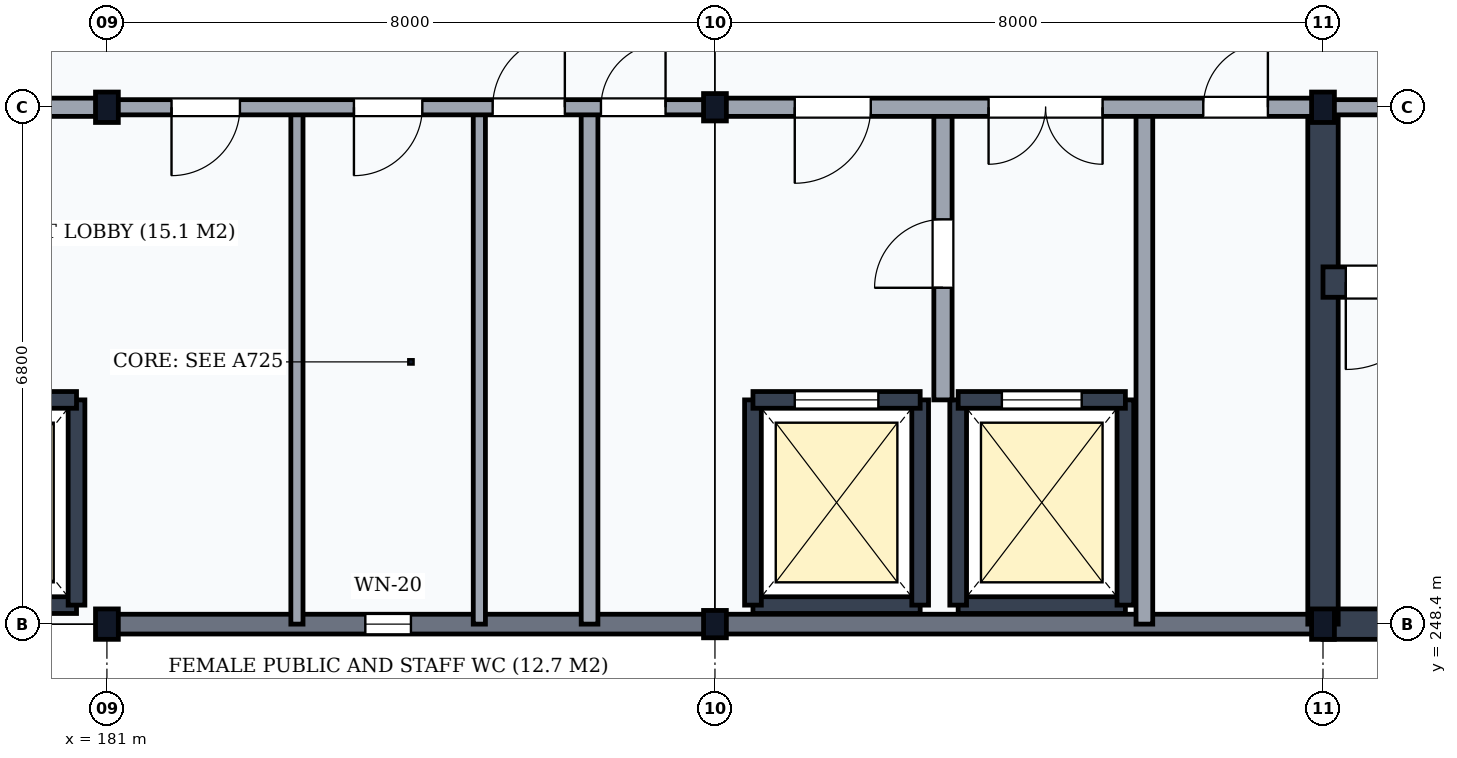
"""IFC4 building model, lengths in metres.
Left out: names, types, materials, properties, quantities, classifications, styles, units other than length and angle.
Written with IfcOpenShell. Run it as: python <this file> out.ifc"""

import sys

from ifc_helpers import new_model, si_unit, direction, frame, frame_2d, origin, origin_2d, place, context, subcontext, project, spatial, rectangle, i_section, extrude, element, fill, save


model = new_model("IFC4")
c1 = context("Model", 3, precision=1e-05, world=origin(), true_north=direction((0.0, 1.0)))
c2 = subcontext(c1, "Body", "Model", "MODEL_VIEW")
j1 = project(units=[si_unit("LENGTHUNIT", "METRE"), si_unit("PLANEANGLEUNIT", "RADIAN")], contexts=[c1])
p1 = place(None, origin())
s1 = spatial("IfcSite", under=j1, at=p1, CompositionType="ELEMENT")
p2 = place(p1, origin())
s2 = spatial("IfcBuilding", under=s1, at=p2, CompositionType="ELEMENT")
p3 = place(p2, frame((0.0, 0.0, 60.0)))
s3 = spatial("IfcBuildingStorey", under=s2, at=p3, CompositionType="ELEMENT", Elevation=60.0)
for number, where, z_axis, x_axis in (
    (1, (181.0, 248.4, 0.0), (0.0, 0.0, 1.0), (1.0, 0.0, 0.0)),
    (2, (181.0, 255.2, 0.0), (0.0, 0.0, 1.0), (1.0, 0.0, 0.0)),
):
    element("IfcColumn", number, at=place(p3, frame(where, z_axis=z_axis, x_axis=x_axis)), inside=s3, PredefinedType="COLUMN", context=c2, shape_type="SweptSolid", body=[
        extrude(i_section(OverallWidth=0.3, OverallDepth=0.4, WebThickness=0.013, FlangeThickness=0.024, FilletRadius=0.027, at=origin_2d()), origin(), (0.0, 0.0, 1.0), 3.9),
    ])
for number, where, z_axis, x_axis in (
    (3, (189.0, 248.4, 0.0), (0.0, 0.0, 1.0), (1.0, 0.0, 0.0)),
    (4, (189.0, 255.2, 0.0), (0.0, 0.0, 1.0), (1.0, 0.0, 0.0)),
):
    element("IfcColumn", number, at=place(p3, frame(where, z_axis=z_axis, x_axis=x_axis)), inside=s3, PredefinedType="COLUMN", context=c2, shape_type="SweptSolid", body=[
        extrude(i_section(OverallWidth=0.3, OverallDepth=0.36, WebThickness=0.012, FlangeThickness=0.022, FilletRadius=0.027, at=origin_2d()), origin(), (0.0, 0.0, 1.0), 3.9),
    ])
for number, where, z_axis, x_axis in (
    (5, (197.0, 248.4, 0.0), (0.0, 0.0, 1.0), (1.0, 0.0, 0.0)),
    (6, (197.0, 255.2, 0.0), (0.0, 0.0, 1.0), (1.0, 0.0, 0.0)),
):
    element("IfcColumn", number, at=place(p3, frame(where, z_axis=z_axis, x_axis=x_axis)), inside=s3, PredefinedType="COLUMN", context=c2, shape_type="SweptSolid", body=[
        extrude(i_section(OverallWidth=0.3, OverallDepth=0.4, WebThickness=0.013, FlangeThickness=0.024, FilletRadius=0.027, at=origin_2d()), origin(), (0.0, 0.0, 1.0), 3.9),
    ])
p4 = place(p3, frame((181.006, 248.4, 0.0), z_axis=(0.0, 0.0, 1.0), x_axis=(1.0, 0.0, 0.0)))
e7 = element("IfcWall", 7, at=p4, inside=s3, PredefinedType="SOLIDWALL", context=c2, shape_type="SweptSolid", body=[
    extrude(rectangle(XDim=7.988, YDim=0.26, at=frame_2d((3.994, 0.0))), origin(), (0.0, 0.0, 1.0), 3.268),
])
p5 = place(p4, frame((3.394, 0.0, 0.95)))
e8 = element("IfcOpeningElement", 8, at=p5, cuts=e7, PredefinedType="OPENING", context=c2, shape_type="SweptSolid", body=[
    extrude(rectangle(XDim=0.6, YDim=1.5, at=frame_2d((0.3, 0.75))), frame((0.0, 0.145, 0.0), z_axis=(0.0, -1.0, 0.0), x_axis=(1.0, 0.0, 0.0)), (0.0, 0.0, 1.0), 0.29),
])
p6 = place(p3, frame((189.006, 248.4, 0.0), z_axis=(0.0, 0.0, 1.0), x_axis=(1.0, 0.0, 0.0)))
e9 = element("IfcWall", 9, at=p6, inside=s3, PredefinedType="SOLIDWALL", context=c2, shape_type="SweptSolid", body=[
    extrude(rectangle(XDim=7.988, YDim=0.26, at=frame_2d((3.994, 0.0))), origin(), (0.0, 0.0, 1.0), 3.268),
])
p7 = place(p3, frame((197.0, 248.4, 0.0), z_axis=(0.0, 0.0, 1.0), x_axis=(1.0, 0.0, 0.0)))
e10 = element("IfcWall", 10, at=p7, inside=s3, PredefinedType="SHEAR", context=c2, shape_type="SweptSolid", body=[
    extrude(rectangle(XDim=8.0, YDim=0.4, at=frame_2d((4.0, 0.0))), origin(), (0.0, 0.0, 1.0), 3.58),
])
p8 = place(p3, frame((197.0, 248.4, 0.0), z_axis=(0.0, 0.0, 1.0), x_axis=(0.0, 1.0, 0.0)))
e11 = element("IfcWall", 11, at=p8, inside=s3, PredefinedType="SHEAR", context=c2, shape_type="SweptSolid", body=[
    extrude(rectangle(XDim=6.8, YDim=0.4, at=frame_2d((3.4, 0.0))), origin(), (0.0, 0.0, 1.0), 3.58),
])
p9 = place(p3, frame((197.0, 252.9, 0.0), z_axis=(0.0, 0.0, 1.0), x_axis=(1.0, 0.0, 0.0)))
e12 = element("IfcWall", 12, at=p9, inside=s3, PredefinedType="SHEAR", context=c2, shape_type="SweptSolid", body=[
    extrude(rectangle(XDim=8.0, YDim=0.4, at=frame_2d((4.0, 0.0))), origin(), (0.0, 0.0, 1.0), 3.58),
])
p10 = place(p9, frame((0.3, 0.0, 0.0)))
e13 = element("IfcOpeningElement", 13, at=p10, cuts=e12, PredefinedType="OPENING", context=c2, shape_type="SweptSolid", body=[
    extrude(rectangle(XDim=1.15, YDim=2.15, at=frame_2d((0.575, 1.075))), frame((0.0, 0.215, 0.0), z_axis=(0.0, -1.0, 0.0), x_axis=(1.0, 0.0, 0.0)), (0.0, 0.0, 1.0), 0.43),
])
p11 = place(p3, frame((197.0, 255.2, 0.0), z_axis=(0.0, 0.0, 1.0), x_axis=(1.0, 0.0, 0.0)))
e14 = element("IfcWall", 14, at=p11, inside=s3, PredefinedType="PARTITIONING", context=c2, shape_type="SweptSolid", body=[
    extrude(rectangle(XDim=8.0, YDim=0.2, at=frame_2d((4.0, 0.0))), origin(), (0.0, 0.0, 1.0), 3.028),
])
p12 = place(p11, frame((3.275, 0.0, 0.0)))
e15 = element("IfcOpeningElement", 15, at=p12, cuts=e14, PredefinedType="OPENING", context=c2, shape_type="SweptSolid", body=[
    extrude(rectangle(XDim=1.45, YDim=2.2, at=frame_2d((0.725, 1.1))), frame((0.0, 0.115, 0.0), z_axis=(0.0, -1.0, 0.0), x_axis=(1.0, 0.0, 0.0)), (0.0, 0.0, 1.0), 0.23),
])
p13 = place(p3, frame((178.4, 248.65, 0.0), z_axis=(0.0, 0.0, 1.0), x_axis=(1.0, 0.0, 0.0)))
e16 = element("IfcWall", 16, at=p13, inside=s3, PredefinedType="SHEAR", context=c2, shape_type="SweptSolid", body=[
    extrude(rectangle(XDim=2.2, YDim=0.22, at=frame_2d((1.1, 0.0))), origin(), (0.0, 0.0, 1.0), 3.58),
])
p14 = place(p3, frame((180.6, 248.65, 0.0), z_axis=(0.0, 0.0, 1.0), x_axis=(0.0, 1.0, 0.0)))
e17 = element("IfcWall", 17, at=p14, inside=s3, PredefinedType="SHEAR", context=c2, shape_type="SweptSolid", body=[
    extrude(rectangle(XDim=2.7, YDim=0.22, at=frame_2d((1.35, 0.0))), origin(), (0.0, 0.0, 1.0), 3.58),
])
p15 = place(p3, frame((178.4, 251.35, 0.0), z_axis=(0.0, 0.0, 1.0), x_axis=(1.0, 0.0, 0.0)))
e18 = element("IfcWall", 18, at=p15, inside=s3, PredefinedType="SHEAR", context=c2, shape_type="SweptSolid", body=[
    extrude(rectangle(XDim=2.2, YDim=0.22, at=frame_2d((1.1, 0.0))), origin(), (0.0, 0.0, 1.0), 3.58),
])
p16 = place(p15, frame((0.575, 0.0, 0.0)))
e19 = element("IfcOpeningElement", 19, at=p16, cuts=e18, PredefinedType="OPENING", context=c2, shape_type="SweptSolid", body=[
    extrude(rectangle(XDim=1.05, YDim=2.15, at=frame_2d((0.525, 1.075))), frame((0.0, 0.125, 0.0), z_axis=(0.0, -1.0, 0.0), x_axis=(1.0, 0.0, 0.0)), (0.0, 0.0, 1.0), 0.25),
])
p17 = place(p3, frame((189.5, 248.65, 0.0), z_axis=(0.0, 0.0, 1.0), x_axis=(1.0, 0.0, 0.0)))
e20 = element("IfcWall", 20, at=p17, inside=s3, PredefinedType="SHEAR", context=c2, shape_type="SweptSolid", body=[
    extrude(rectangle(XDim=2.2, YDim=0.22, at=frame_2d((1.1, 0.0))), origin(), (0.0, 0.0, 1.0), 3.58),
])
for number, where, z_axis, x_axis in (
    (21, (189.5, 248.65, 0.0), (0.0, 0.0, 1.0), (0.0, 1.0, 0.0)),
    (22, (191.7, 248.65, 0.0), (0.0, 0.0, 1.0), (0.0, 1.0, 0.0)),
):
    element("IfcWall", number, at=place(p3, frame(where, z_axis=z_axis, x_axis=x_axis)), inside=s3, PredefinedType="SHEAR", context=c2, shape_type="SweptSolid", body=[
        extrude(rectangle(XDim=2.7, YDim=0.22, at=frame_2d((1.35, 0.0))), origin(), (0.0, 0.0, 1.0), 3.58),
    ])
p18 = place(p3, frame((189.5, 251.35, 0.0), z_axis=(0.0, 0.0, 1.0), x_axis=(1.0, 0.0, 0.0)))
e23 = element("IfcWall", 23, at=p18, inside=s3, PredefinedType="SHEAR", context=c2, shape_type="SweptSolid", body=[
    extrude(rectangle(XDim=2.2, YDim=0.22, at=frame_2d((1.1, 0.0))), origin(), (0.0, 0.0, 1.0), 3.58),
])
p19 = place(p18, frame((0.55, 0.0, 0.0)))
e24 = element("IfcOpeningElement", 24, at=p19, cuts=e23, PredefinedType="OPENING", context=c2, shape_type="SweptSolid", body=[
    extrude(rectangle(XDim=1.1, YDim=2.15, at=frame_2d((0.55, 1.075))), frame((0.0, 0.125, 0.0), z_axis=(0.0, -1.0, 0.0), x_axis=(1.0, 0.0, 0.0)), (0.0, 0.0, 1.0), 0.25),
])
p20 = place(p3, frame((192.2, 248.65, 0.0), z_axis=(0.0, 0.0, 1.0), x_axis=(1.0, 0.0, 0.0)))
e25 = element("IfcWall", 25, at=p20, inside=s3, PredefinedType="SHEAR", context=c2, shape_type="SweptSolid", body=[
    extrude(rectangle(XDim=2.2, YDim=0.22, at=frame_2d((1.1, 0.0))), origin(), (0.0, 0.0, 1.0), 3.58),
])
for number, where, z_axis, x_axis in (
    (26, (192.2, 248.65, 0.0), (0.0, 0.0, 1.0), (0.0, 1.0, 0.0)),
    (27, (194.4, 248.65, 0.0), (0.0, 0.0, 1.0), (0.0, 1.0, 0.0)),
):
    element("IfcWall", number, at=place(p3, frame(where, z_axis=z_axis, x_axis=x_axis)), inside=s3, PredefinedType="SHEAR", context=c2, shape_type="SweptSolid", body=[
        extrude(rectangle(XDim=2.7, YDim=0.22, at=frame_2d((1.35, 0.0))), origin(), (0.0, 0.0, 1.0), 3.58),
    ])
p21 = place(p3, frame((192.2, 251.35, 0.0), z_axis=(0.0, 0.0, 1.0), x_axis=(1.0, 0.0, 0.0)))
e28 = element("IfcWall", 28, at=p21, inside=s3, PredefinedType="SHEAR", context=c2, shape_type="SweptSolid", body=[
    extrude(rectangle(XDim=2.2, YDim=0.22, at=frame_2d((1.1, 0.0))), origin(), (0.0, 0.0, 1.0), 3.58),
])
p22 = place(p21, frame((0.575, 0.0, 0.0)))
e29 = element("IfcOpeningElement", 29, at=p22, cuts=e28, PredefinedType="OPENING", context=c2, shape_type="SweptSolid", body=[
    extrude(rectangle(XDim=1.05, YDim=2.15, at=frame_2d((0.525, 1.075))), frame((0.0, 0.125, 0.0), z_axis=(0.0, -1.0, 0.0), x_axis=(1.0, 0.0, 0.0)), (0.0, 0.0, 1.0), 0.25),
])
p23 = place(p3, frame((192.0, 251.35, 0.0), z_axis=(0.0, 0.0, 1.0), x_axis=(0.0, 1.0, 0.0)))
e30 = element("IfcWall", 30, at=p23, inside=s3, PredefinedType="PARTITIONING", context=c2, shape_type="SweptSolid", body=[
    extrude(rectangle(XDim=3.85, YDim=0.24, at=frame_2d((1.925, 0.0))), origin(), (0.0, 0.0, 1.0), 3.58),
])
p24 = place(p23, frame((1.475, 0.0, 0.0)))
e31 = element("IfcOpeningElement", 31, at=p24, cuts=e30, PredefinedType="OPENING", context=c2, shape_type="SweptSolid", body=[
    extrude(rectangle(XDim=0.9, YDim=2.1, at=frame_2d((0.45, 1.05))), frame((0.0, 0.135, 0.0), z_axis=(0.0, -1.0, 0.0), x_axis=(1.0, 0.0, 0.0)), (0.0, 0.0, 1.0), 0.27),
])
p25 = place(p3, frame((194.65, 248.4, 0.0), z_axis=(0.0, 0.0, 1.0), x_axis=(0.0, 1.0, 0.0)))
e32 = element("IfcWall", 32, at=p25, inside=s3, PredefinedType="PARTITIONING", context=c2, shape_type="SweptSolid", body=[
    extrude(rectangle(XDim=6.8, YDim=0.22, at=frame_2d((3.4, 0.0))), origin(), (0.0, 0.0, 1.0), 3.58),
])
for number, where, z_axis, x_axis in (
    (33, (183.5, 248.4, 0.0), (0.0, 0.0, 1.0), (0.0, 1.0, 0.0)),
    (34, (185.9, 248.4, 0.0), (0.0, 0.0, 1.0), (0.0, 1.0, 0.0)),
):
    element("IfcWall", number, at=place(p3, frame(where, z_axis=z_axis, x_axis=x_axis)), inside=s3, PredefinedType="PARTITIONING", context=c2, shape_type="SweptSolid", body=[
        extrude(rectangle(XDim=6.8, YDim=0.16, at=frame_2d((3.4, 0.0))), origin(), (0.0, 0.0, 1.0), 3.58),
    ])
p26 = place(p3, frame((187.35, 248.4, 0.0), z_axis=(0.0, 0.0, 1.0), x_axis=(0.0, 1.0, 0.0)))
e35 = element("IfcWall", 35, at=p26, inside=s3, PredefinedType="PARTITIONING", context=c2, shape_type="SweptSolid", body=[
    extrude(rectangle(XDim=6.8, YDim=0.22, at=frame_2d((3.4, 0.0))), origin(), (0.0, 0.0, 1.0), 3.58),
])
p27 = place(p3, frame((173.0, 255.2, 0.0), z_axis=(0.0, 0.0, 1.0), x_axis=(1.0, 0.0, 0.0)))
e36 = element("IfcWall", 36, at=p27, inside=s3, PredefinedType="PARTITIONING", context=c2, shape_type="SweptSolid", body=[
    extrude(rectangle(XDim=8.0, YDim=0.24, at=frame_2d((4.0, 0.0))), origin(), (0.0, 0.0, 1.0), 3.028),
])
p28 = place(p27, frame((1.05, 0.0, 0.0)))
e37 = element("IfcOpeningElement", 37, at=p28, cuts=e36, PredefinedType="OPENING", context=c2, shape_type="SweptSolid", body=[
    extrude(rectangle(XDim=1.0, YDim=2.1, at=frame_2d((0.5, 1.05))), frame((0.0, 0.135, 0.0), z_axis=(0.0, -1.0, 0.0), x_axis=(1.0, 0.0, 0.0)), (0.0, 0.0, 1.0), 0.27),
])
p29 = place(p27, frame((4.6, 0.0, 0.0)))
e38 = element("IfcOpeningElement", 38, at=p29, cuts=e36, PredefinedType="OPENING", context=c2, shape_type="SweptSolid", body=[
    extrude(rectangle(XDim=1.6, YDim=2.25, at=frame_2d((0.8, 1.125))), frame((0.0, 0.135, 0.0), z_axis=(0.0, -1.0, 0.0), x_axis=(1.0, 0.0, 0.0)), (0.0, 0.0, 1.0), 0.27),
])
p30 = place(p3, frame((181.0, 255.2, 0.0), z_axis=(0.0, 0.0, 1.0), x_axis=(1.0, 0.0, 0.0)))
e39 = element("IfcWall", 39, at=p30, inside=s3, PredefinedType="PARTITIONING", context=c2, shape_type="SweptSolid", body=[
    extrude(rectangle(XDim=8.0, YDim=0.2, at=frame_2d((4.0, 0.0))), origin(), (0.0, 0.0, 1.0), 3.028),
])
p31 = place(p30, frame((0.85, 0.0, 0.0)))
e40 = element("IfcOpeningElement", 40, at=p31, cuts=e39, PredefinedType="OPENING", context=c2, shape_type="SweptSolid", body=[
    extrude(rectangle(XDim=0.9, YDim=2.1, at=frame_2d((0.45, 1.05))), frame((0.0, 0.115, 0.0), z_axis=(0.0, -1.0, 0.0), x_axis=(1.0, 0.0, 0.0)), (0.0, 0.0, 1.0), 0.23),
])
p32 = place(p30, frame((3.25, 0.0, 0.0)))
e41 = element("IfcOpeningElement", 41, at=p32, cuts=e39, PredefinedType="OPENING", context=c2, shape_type="SweptSolid", body=[
    extrude(rectangle(XDim=0.9, YDim=2.1, at=frame_2d((0.45, 1.05))), frame((0.0, 0.115, 0.0), z_axis=(0.0, -1.0, 0.0), x_axis=(1.0, 0.0, 0.0)), (0.0, 0.0, 1.0), 0.23),
])
p33 = place(p30, frame((5.075, 0.0, 0.0)))
e42 = element("IfcOpeningElement", 42, at=p33, cuts=e39, PredefinedType="OPENING", context=c2, shape_type="SweptSolid", body=[
    extrude(rectangle(XDim=0.95, YDim=2.1, at=frame_2d((0.475, 1.05))), frame((0.0, 0.115, 0.0), z_axis=(0.0, -1.0, 0.0), x_axis=(1.0, 0.0, 0.0)), (0.0, 0.0, 1.0), 0.23),
])
p34 = place(p30, frame((6.5, 0.0, 0.0)))
e43 = element("IfcOpeningElement", 43, at=p34, cuts=e39, PredefinedType="OPENING", context=c2, shape_type="SweptSolid", body=[
    extrude(rectangle(XDim=0.85, YDim=2.1, at=frame_2d((0.425, 1.05))), frame((0.0, 0.115, 0.0), z_axis=(0.0, -1.0, 0.0), x_axis=(1.0, 0.0, 0.0)), (0.0, 0.0, 1.0), 0.23),
])
p35 = place(p3, frame((189.0, 255.2, 0.0), z_axis=(0.0, 0.0, 1.0), x_axis=(1.0, 0.0, 0.0)))
e44 = element("IfcWall", 44, at=p35, inside=s3, PredefinedType="PARTITIONING", context=c2, shape_type="SweptSolid", body=[
    extrude(rectangle(XDim=8.0, YDim=0.24, at=frame_2d((4.0, 0.0))), origin(), (0.0, 0.0, 1.0), 3.028),
])
p36 = place(p35, frame((1.05, 0.0, 0.0)))
e45 = element("IfcOpeningElement", 45, at=p36, cuts=e44, PredefinedType="OPENING", context=c2, shape_type="SweptSolid", body=[
    extrude(rectangle(XDim=1.0, YDim=2.1, at=frame_2d((0.5, 1.05))), frame((0.0, 0.135, 0.0), z_axis=(0.0, -1.0, 0.0), x_axis=(1.0, 0.0, 0.0)), (0.0, 0.0, 1.0), 0.27),
])
p37 = place(p35, frame((3.6, 0.0, 0.0)))
e46 = element("IfcOpeningElement", 46, at=p37, cuts=e44, PredefinedType="OPENING", context=c2, shape_type="SweptSolid", body=[
    extrude(rectangle(XDim=1.5, YDim=2.25, at=frame_2d((0.75, 1.125))), frame((0.0, 0.135, 0.0), z_axis=(0.0, -1.0, 0.0), x_axis=(1.0, 0.0, 0.0)), (0.0, 0.0, 1.0), 0.27),
])
p38 = place(p35, frame((6.425, 0.0, 0.0)))
e47 = element("IfcOpeningElement", 47, at=p38, cuts=e44, PredefinedType="OPENING", context=c2, shape_type="SweptSolid", body=[
    extrude(rectangle(XDim=0.85, YDim=2.1, at=frame_2d((0.425, 1.05))), frame((0.0, 0.135, 0.0), z_axis=(0.0, -1.0, 0.0), x_axis=(1.0, 0.0, 0.0)), (0.0, 0.0, 1.0), 0.27),
])
p39 = place(p5, origin())
e48 = element("IfcWindow", 48, at=p39, inside=s3, PartitioningType="SINGLE_PANEL", PredefinedType="WINDOW", context=c2, shape_type="SweptSolid", body=[
    extrude(rectangle(XDim=0.6, YDim=1.5, at=frame_2d((0.3, 0.75))), frame((0.0, 0.03, 0.0), z_axis=(0.0, -1.0, 0.0), x_axis=(1.0, 0.0, 0.0)), (0.0, 0.0, 1.0), 0.06),
])
fill(e8, e48)
p40 = place(p10, frame((1.15, 0.0, 0.0), z_axis=(0.0, 0.0, 1.0), x_axis=(-1.0, 0.0, 0.0)))
e49 = element("IfcDoor", 49, at=p40, inside=s3, OperationType="SINGLE_SWING_RIGHT", PredefinedType="DOOR", context=c2, shape_type="SweptSolid", body=[
    extrude(rectangle(XDim=1.15, YDim=2.15, at=frame_2d((0.575, 1.075))), frame((0.0, 0.025, 0.0), z_axis=(0.0, -1.0, 0.0), x_axis=(1.0, 0.0, 0.0)), (0.0, 0.0, 1.0), 0.05),
])
fill(e13, e49)
p41 = place(p19, origin())
e50 = element("IfcDoor", 50, at=p41, inside=s3, OperationType="DOUBLE_DOOR_SLIDING", PredefinedType="USERDEFINED", context=c2, shape_type="SweptSolid", body=[
    extrude(rectangle(XDim=1.1, YDim=2.15, at=frame_2d((0.55, 1.075))), frame((0.0, 0.025, 0.0), z_axis=(0.0, -1.0, 0.0), x_axis=(1.0, 0.0, 0.0)), (0.0, 0.0, 1.0), 0.05),
])
fill(e24, e50)
p42 = place(p22, origin())
e51 = element("IfcDoor", 51, at=p42, inside=s3, OperationType="DOUBLE_DOOR_SLIDING", PredefinedType="USERDEFINED", context=c2, shape_type="SweptSolid", body=[
    extrude(rectangle(XDim=1.05, YDim=2.15, at=frame_2d((0.525, 1.075))), frame((0.0, 0.025, 0.0), z_axis=(0.0, -1.0, 0.0), x_axis=(1.0, 0.0, 0.0)), (0.0, 0.0, 1.0), 0.05),
])
fill(e29, e51)
p43 = place(p24, origin())
e52 = element("IfcDoor", 52, at=p43, inside=s3, OperationType="SINGLE_SWING_LEFT", PredefinedType="DOOR", context=c2, shape_type="SweptSolid", body=[
    extrude(rectangle(XDim=0.9, YDim=2.1, at=frame_2d((0.45, 1.05))), frame((0.0, 0.025, 0.0), z_axis=(0.0, -1.0, 0.0), x_axis=(1.0, 0.0, 0.0)), (0.0, 0.0, 1.0), 0.05),
])
fill(e31, e52)
p44 = place(p31, frame((0.9, 0.0, 0.0), z_axis=(0.0, 0.0, 1.0), x_axis=(-1.0, 0.0, 0.0)))
e53 = element("IfcDoor", 53, at=p44, inside=s3, OperationType="SINGLE_SWING_RIGHT", PredefinedType="DOOR", context=c2, shape_type="SweptSolid", body=[
    extrude(rectangle(XDim=0.9, YDim=2.1, at=frame_2d((0.45, 1.05))), frame((0.0, 0.025, 0.0), z_axis=(0.0, -1.0, 0.0), x_axis=(1.0, 0.0, 0.0)), (0.0, 0.0, 1.0), 0.05),
])
fill(e40, e53)
p45 = place(p32, frame((0.9, 0.0, 0.0), z_axis=(0.0, 0.0, 1.0), x_axis=(-1.0, 0.0, 0.0)))
e54 = element("IfcDoor", 54, at=p45, inside=s3, OperationType="SINGLE_SWING_RIGHT", PredefinedType="DOOR", context=c2, shape_type="SweptSolid", body=[
    extrude(rectangle(XDim=0.9, YDim=2.1, at=frame_2d((0.45, 1.05))), frame((0.0, 0.025, 0.0), z_axis=(0.0, -1.0, 0.0), x_axis=(1.0, 0.0, 0.0)), (0.0, 0.0, 1.0), 0.05),
])
fill(e41, e54)
p46 = place(p33, frame((0.95, 0.0, 0.0), z_axis=(0.0, 0.0, 1.0), x_axis=(-1.0, 0.0, 0.0)))
e55 = element("IfcDoor", 55, at=p46, inside=s3, OperationType="SINGLE_SWING_LEFT", PredefinedType="DOOR", context=c2, shape_type="SweptSolid", body=[
    extrude(rectangle(XDim=0.95, YDim=2.1, at=frame_2d((0.475, 1.05))), frame((0.0, 0.025, 0.0), z_axis=(0.0, -1.0, 0.0), x_axis=(1.0, 0.0, 0.0)), (0.0, 0.0, 1.0), 0.05),
])
fill(e42, e55)
p47 = place(p34, frame((0.85, 0.0, 0.0), z_axis=(0.0, 0.0, 1.0), x_axis=(-1.0, 0.0, 0.0)))
e56 = element("IfcDoor", 56, at=p47, inside=s3, OperationType="SINGLE_SWING_LEFT", PredefinedType="DOOR", context=c2, shape_type="SweptSolid", body=[
    extrude(rectangle(XDim=0.85, YDim=2.1, at=frame_2d((0.425, 1.05))), frame((0.0, 0.025, 0.0), z_axis=(0.0, -1.0, 0.0), x_axis=(1.0, 0.0, 0.0)), (0.0, 0.0, 1.0), 0.05),
])
fill(e43, e56)
p48 = place(p36, frame((1.0, 0.0, 0.0), z_axis=(0.0, 0.0, 1.0), x_axis=(-1.0, 0.0, 0.0)))
e57 = element("IfcDoor", 57, at=p48, inside=s3, OperationType="SINGLE_SWING_RIGHT", PredefinedType="DOOR", context=c2, shape_type="SweptSolid", body=[
    extrude(rectangle(XDim=1.0, YDim=2.1, at=frame_2d((0.5, 1.05))), frame((0.0, 0.025, 0.0), z_axis=(0.0, -1.0, 0.0), x_axis=(1.0, 0.0, 0.0)), (0.0, 0.0, 1.0), 0.05),
])
fill(e45, e57)
p49 = place(p37, frame((1.5, 0.0, 0.0), z_axis=(0.0, 0.0, 1.0), x_axis=(-1.0, 0.0, 0.0)))
e58 = element("IfcDoor", 58, at=p49, inside=s3, OperationType="DOUBLE_DOOR_SINGLE_SWING", PredefinedType="DOOR", context=c2, shape_type="SweptSolid", body=[
    extrude(rectangle(XDim=1.5, YDim=2.25, at=frame_2d((0.75, 1.125))), frame((0.0, 0.025, 0.0), z_axis=(0.0, -1.0, 0.0), x_axis=(1.0, 0.0, 0.0)), (0.0, 0.0, 1.0), 0.05),
])
fill(e46, e58)
p50 = place(p38, frame((0.85, 0.0, 0.0), z_axis=(0.0, 0.0, 1.0), x_axis=(-1.0, 0.0, 0.0)))
e59 = element("IfcDoor", 59, at=p50, inside=s3, OperationType="SINGLE_SWING_LEFT", PredefinedType="DOOR", context=c2, shape_type="SweptSolid", body=[
    extrude(rectangle(XDim=0.85, YDim=2.1, at=frame_2d((0.425, 1.05))), frame((0.0, 0.025, 0.0), z_axis=(0.0, -1.0, 0.0), x_axis=(1.0, 0.0, 0.0)), (0.0, 0.0, 1.0), 0.05),
])
fill(e47, e59)
save(model, sys.argv[1])
